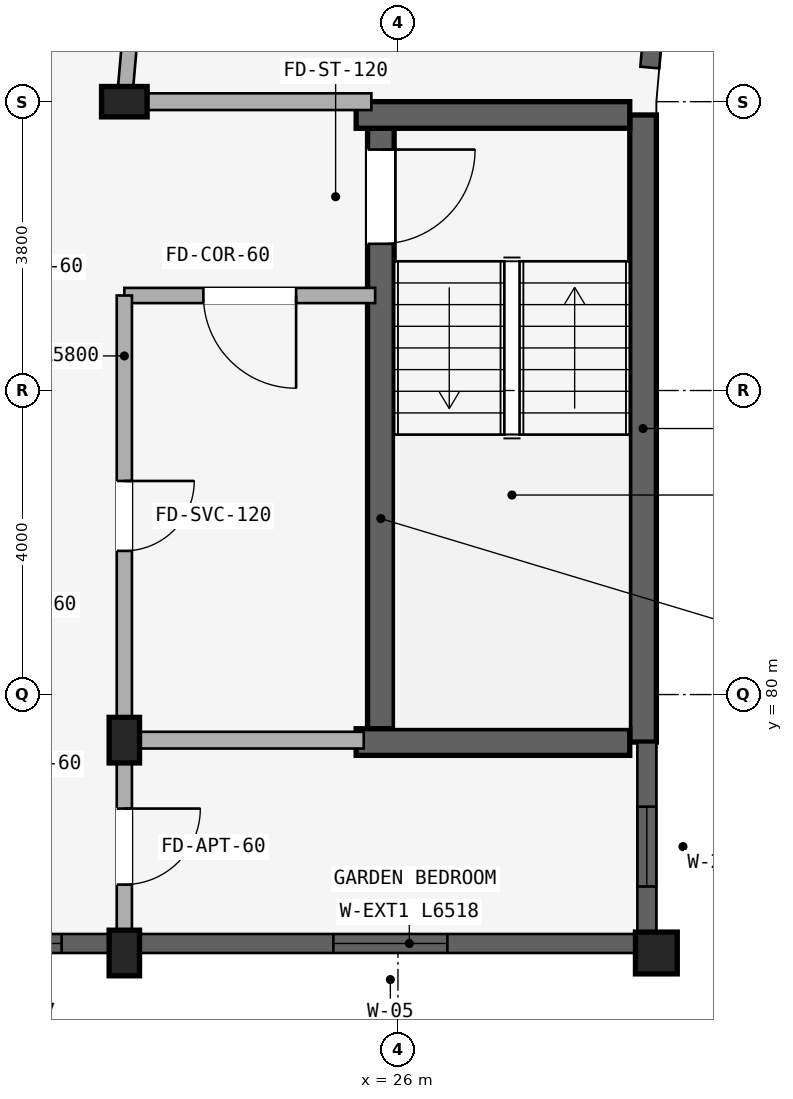
"""IFC4 building model, lengths in metres.
Left out: names, types, materials, properties, quantities, classifications, styles, units other than length and angle.
Written with IfcOpenShell. Run it as: python <this file> out.ifc"""

import sys

from ifc_helpers import new_model, si_unit, direction, frame, frame_2d, origin, origin_2d, place, context, subcontext, project, spatial, rectangle, extrude, element, fill, save


model = new_model("IFC4")
c1 = context("Model", 3, precision=1e-05, world=origin(), true_north=direction((0.0, 1.0)))
c2 = subcontext(c1, "Body", "Model", "MODEL_VIEW")
j1 = project(units=[si_unit("LENGTHUNIT", "METRE"), si_unit("PLANEANGLEUNIT", "RADIAN")], contexts=[c1])
p1 = place(None, origin())
s1 = spatial("IfcSite", under=j1, at=p1, CompositionType="ELEMENT")
p2 = place(p1, origin())
s2 = spatial("IfcBuilding", under=s1, at=p2, CompositionType="ELEMENT")
p3 = place(p2, frame((0.0, 0.0, 46.5)))
s3 = spatial("IfcBuildingStorey", under=s2, at=p3, CompositionType="ELEMENT", Elevation=46.5)
p4 = place(p3, frame((29.225, 87.625, 0.0), z_axis=(0.0, 0.0, 1.0), x_axis=(0.0, -1.0, 0.0)))
e1 = element("IfcWall", 1, at=p4, inside=s3, PredefinedType="SHEAR", context=c2, shape_type="SweptSolid", body=[
    extrude(rectangle(XDim=8.25, YDim=0.35, at=frame_2d((4.125, 0.0))), origin(), (0.0, 0.0, 1.0), 2.93),
])
p5 = place(p3, frame((25.775, 87.45, 0.0), z_axis=(0.0, 0.0, 1.0), x_axis=(0.0, -1.0, 0.0)))
e2 = element("IfcWall", 2, at=p5, inside=s3, PredefinedType="SHEAR", context=c2, shape_type="SweptSolid", body=[
    extrude(rectangle(XDim=7.9, YDim=0.35, at=frame_2d((3.95, 0.0))), origin(), (0.0, 0.0, 1.0), 2.93),
])
p6 = place(p5, frame((0.28, 0.0, 0.0)))
e3 = element("IfcOpeningElement", 3, at=p6, cuts=e2, PredefinedType="OPENING", context=c2, shape_type="SweptSolid", body=[
    extrude(rectangle(XDim=1.24, YDim=2.15, at=frame_2d((0.62, 1.075))), frame((0.0, 0.185, 0.0), z_axis=(0.0, -1.0, 0.0), x_axis=(1.0, 0.0, 0.0)), (0.0, 0.0, 1.0), 0.37),
])
for number, where, z_axis, x_axis in (
    (4, (29.05, 87.625, 0.0), (0.0, 0.0, 1.0), (-1.0, 0.0, 0.0)),
    (5, (29.05, 79.375, 0.0), (0.0, 0.0, 1.0), (-1.0, 0.0, 0.0)),
):
    element("IfcWall", number, at=place(p3, frame(where, z_axis=z_axis, x_axis=x_axis)), inside=s3, PredefinedType="SHEAR", context=c2, shape_type="SweptSolid", body=[
        extrude(rectangle(XDim=3.6, YDim=0.35, at=frame_2d((1.8, 0.0))), origin(), (0.0, 0.0, 1.0), 2.93),
    ])
for number, where, z_axis, x_axis in (
    (6, (22.4, 87.8, 0.0), (0.0, 0.0, 1.0), (0.0, 1.0, 0.0)),
    (7, (22.4, 79.4, 0.0), (0.0, 0.0, 1.0), (1.0, 0.0, 0.0)),
):
    element("IfcColumn", number, at=place(p3, frame(where, z_axis=z_axis, x_axis=x_axis)), inside=s3, PredefinedType="COLUMN", context=c2, shape_type="SweptSolid", body=[
        extrude(rectangle(XDim=0.4, YDim=0.6, at=origin_2d()), origin(), (0.0, 0.0, 1.0), 2.93),
    ])
p7 = place(p3, frame((29.4, 76.6, 0.0), z_axis=(0.0, 0.0, 1.0), x_axis=(1.0, 0.0, 0.0)))
e8 = element("IfcColumn", 8, at=p7, inside=s3, PredefinedType="COLUMN", context=c2, shape_type="SweptSolid", body=[
    extrude(rectangle(XDim=0.55, YDim=0.55, at=origin_2d()), origin(), (0.0, 0.0, 1.0), 2.93),
])
p8 = place(p3, frame((22.4, 76.6, 0.0), z_axis=(0.0, 0.0, 1.0), x_axis=(1.0, 0.0, 0.0)))
e9 = element("IfcColumn", 9, at=p8, inside=s3, PredefinedType="COLUMN", context=c2, shape_type="SweptSolid", body=[
    extrude(rectangle(XDim=0.4, YDim=0.6, at=origin_2d()), origin(), (0.0, 0.0, 1.0), 2.93),
])
p9 = place(p3, frame((25.7, 85.25, 0.0), z_axis=(0.0, 0.0, 1.0), x_axis=(-1.0, 0.0, 0.0)))
e10 = element("IfcWall", 10, at=p9, inside=s3, PredefinedType="STANDARD", context=c2, shape_type="SweptSolid", body=[
    extrude(rectangle(XDim=3.3, YDim=0.2, at=frame_2d((1.65, 0.0))), origin(), (0.0, 0.0, 1.0), 2.372),
])
p10 = place(p9, frame((1.04, 0.0, 0.0)))
e11 = element("IfcOpeningElement", 11, at=p10, cuts=e10, PredefinedType="OPENING", context=c2, shape_type="SweptSolid", body=[
    extrude(rectangle(XDim=1.22, YDim=2.15, at=frame_2d((0.61, 1.075))), frame((0.0, 0.11, 0.0), z_axis=(0.0, -1.0, 0.0), x_axis=(1.0, 0.0, 0.0)), (0.0, 0.0, 1.0), 0.22),
])
p11 = place(p3, frame((22.4, 85.25, 0.0), z_axis=(0.0, 0.0, 1.0), x_axis=(0.0, -1.0, 0.0)))
e12 = element("IfcWall", 12, at=p11, inside=s3, PredefinedType="STANDARD", context=c2, shape_type="SweptSolid", body=[
    extrude(rectangle(XDim=5.8, YDim=0.2, at=frame_2d((2.9, 0.0))), origin(), (0.0, 0.0, 1.0), 2.372),
])
p12 = place(p11, frame((2.44, 0.0, 0.0)))
e13 = element("IfcOpeningElement", 13, at=p12, cuts=e12, PredefinedType="OPENING", context=c2, shape_type="SweptSolid", body=[
    extrude(rectangle(XDim=0.92, YDim=2.1, at=frame_2d((0.46, 1.05))), frame((0.0, 0.11, 0.0), z_axis=(0.0, -1.0, 0.0), x_axis=(1.0, 0.0, 0.0)), (0.0, 0.0, 1.0), 0.22),
])
p13 = place(p3, frame((22.792, 92.28, 0.0), z_axis=(0.0, 0.0, 1.0), x_axis=(-0.087187153726, -0.996191949488, 0.0)))
e14 = element("IfcWall", 14, at=p13, inside=s3, PredefinedType="STANDARD", context=c2, shape_type="SweptSolid", body=[
    extrude(rectangle(XDim=4.497, YDim=0.2, at=frame_2d((2.249, 0.0))), origin(), (0.0, 0.0, 1.0), 2.372),
])
p14 = place(p3, frame((25.65, 87.8, 0.0), z_axis=(0.0, 0.0, 1.0), x_axis=(-1.0, 0.0, 0.0)))
e15 = element("IfcWall", 15, at=p14, inside=s3, PredefinedType="STANDARD", context=c2, shape_type="SweptSolid", body=[
    extrude(rectangle(XDim=3.2, YDim=0.22, at=frame_2d((1.6, 0.0))), origin(), (0.0, 0.0, 1.0), 2.372),
])
p15 = place(p3, frame((22.4, 79.4, 0.0), z_axis=(0.0, 0.0, 1.0), x_axis=(0.0, -1.0, 0.0)))
e16 = element("IfcWall", 16, at=p15, inside=s3, PredefinedType="STANDARD", context=c2, shape_type="SweptSolid", body=[
    extrude(rectangle(XDim=2.8, YDim=0.2, at=frame_2d((1.4, 0.0))), origin(), (0.0, 0.0, 1.0), 2.372),
])
p16 = place(p15, frame((0.9, 0.0, 0.0)))
e17 = element("IfcOpeningElement", 17, at=p16, cuts=e16, PredefinedType="OPENING", context=c2, shape_type="SweptSolid", body=[
    extrude(rectangle(XDim=1.0, YDim=2.15, at=frame_2d((0.5, 1.075))), frame((0.0, 0.11, 0.0), z_axis=(0.0, -1.0, 0.0), x_axis=(1.0, 0.0, 0.0)), (0.0, 0.0, 1.0), 0.22),
])
p17 = place(p3, frame((25.55, 79.4, 0.0), z_axis=(0.0, 0.0, 1.0), x_axis=(-1.0, 0.0, 0.0)))
e18 = element("IfcWall", 18, at=p17, inside=s3, PredefinedType="STANDARD", context=c2, shape_type="SweptSolid", body=[
    extrude(rectangle(XDim=3.1, YDim=0.22, at=frame_2d((1.55, 0.0))), origin(), (0.0, 0.0, 1.0), 2.372),
])
p18 = place(p3, frame((29.541, 90.848, 0.0), z_axis=(0.0, 0.0, 1.0), x_axis=(-0.087227322402, -0.996188433092, 0.0)))
e19 = element("IfcWall", 19, at=p18, inside=s3, PredefinedType="STANDARD", context=c2, shape_type="SweptSolid", body=[
    extrude(rectangle(XDim=2.609, YDim=0.25, at=frame_2d((1.304, 0.0))), origin(), (0.0, 0.0, 1.0), 2.472),
])
p19 = place(p18, frame((0.66, 0.0, 0.622)))
e20 = element("IfcOpeningElement", 20, at=p19, cuts=e19, PredefinedType="OPENING", context=c2, shape_type="SweptSolid", body=[
    extrude(rectangle(XDim=1.5, YDim=1.65, at=frame_2d((0.75, 0.825))), frame((0.0, 0.135, 0.0), z_axis=(0.0, -1.0, 0.0), x_axis=(1.0, 0.0, 0.0)), (0.0, 0.0, 1.0), 0.27),
])
p20 = place(p3, frame((29.275, 79.372, 0.0), z_axis=(0.0, 0.0, 1.0), x_axis=(0.0, -1.0, 0.0)))
e21 = element("IfcWall", 21, at=p20, inside=s3, PredefinedType="STANDARD", context=c2, shape_type="SweptSolid", body=[
    extrude(rectangle(XDim=2.493, YDim=0.25, at=frame_2d((1.247, 0.0))), origin(), (0.0, 0.0, 1.0), 2.472),
])
p21 = place(p20, frame((0.846, 0.0, 0.88)))
e22 = element("IfcOpeningElement", 22, at=p21, cuts=e21, PredefinedType="OPENING", context=c2, shape_type="SweptSolid", body=[
    extrude(rectangle(XDim=1.05, YDim=1.25, at=frame_2d((0.525, 0.625))), frame((0.0, 0.135, 0.0), z_axis=(0.0, -1.0, 0.0), x_axis=(1.0, 0.0, 0.0)), (0.0, 0.0, 1.0), 0.27),
])
p22 = place(p3, frame((29.122, 76.725, 0.0), z_axis=(0.0, 0.0, 1.0), x_axis=(-1.0, 0.0, 0.0)))
e23 = element("IfcWall", 23, at=p22, inside=s3, PredefinedType="STANDARD", context=c2, shape_type="SweptSolid", body=[
    extrude(rectangle(XDim=6.518, YDim=0.25, at=frame_2d((3.259, 0.0))), origin(), (0.0, 0.0, 1.0), 2.372),
])
p23 = place(p22, frame((2.471, 0.0, 0.522)))
e24 = element("IfcOpeningElement", 24, at=p23, cuts=e23, PredefinedType="OPENING", context=c2, shape_type="SweptSolid", body=[
    extrude(rectangle(XDim=1.5, YDim=1.65, at=frame_2d((0.75, 0.825))), frame((0.0, 0.135, 0.0), z_axis=(0.0, -1.0, 0.0), x_axis=(1.0, 0.0, 0.0)), (0.0, 0.0, 1.0), 0.27),
])
p24 = place(p3, frame((22.197, 76.725, 0.0), z_axis=(0.0, 0.0, 1.0), x_axis=(-1.0, 0.0, 0.0)))
e25 = element("IfcWall", 25, at=p24, inside=s3, PredefinedType="STANDARD", context=c2, shape_type="SweptSolid", body=[
    extrude(rectangle(XDim=1.993, YDim=0.25, at=frame_2d((0.997, 0.0))), origin(), (0.0, 0.0, 1.0), 2.372),
])
p25 = place(p24, frame((0.622, 0.0, 0.88)))
e26 = element("IfcOpeningElement", 26, at=p25, cuts=e25, PredefinedType="OPENING", context=c2, shape_type="SweptSolid", body=[
    extrude(rectangle(XDim=0.75, YDim=1.05, at=frame_2d((0.375, 0.525))), frame((0.0, 0.135, 0.0), z_axis=(0.0, -1.0, 0.0), x_axis=(1.0, 0.0, 0.0)), (0.0, 0.0, 1.0), 0.27),
])
p26 = place(p21, origin())
e27 = element("IfcWindow", 27, at=p26, inside=s3, PartitioningType="SINGLE_PANEL", PredefinedType="WINDOW", context=c2, shape_type="SweptSolid", body=[
    extrude(rectangle(XDim=1.05, YDim=1.25, at=frame_2d((0.525, 0.625))), frame((0.0, 0.03, 0.0), z_axis=(0.0, -1.0, 0.0), x_axis=(1.0, 0.0, 0.0)), (0.0, 0.0, 1.0), 0.06),
])
fill(e22, e27)
p27 = place(p23, origin())
e28 = element("IfcWindow", 28, at=p27, inside=s3, PartitioningType="DOUBLE_PANEL_VERTICAL", PredefinedType="WINDOW", context=c2, shape_type="SweptSolid", body=[
    extrude(rectangle(XDim=1.5, YDim=1.65, at=frame_2d((0.75, 0.825))), frame((0.0, 0.03, 0.0), z_axis=(0.0, -1.0, 0.0), x_axis=(1.0, 0.0, 0.0)), (0.0, 0.0, 1.0), 0.06),
])
fill(e24, e28)
p28 = place(p25, origin())
e29 = element("IfcWindow", 29, at=p28, inside=s3, PartitioningType="SINGLE_PANEL", PredefinedType="WINDOW", context=c2, shape_type="SweptSolid", body=[
    extrude(rectangle(XDim=0.75, YDim=1.05, at=frame_2d((0.375, 0.525))), frame((0.0, 0.03, 0.0), z_axis=(0.0, -1.0, 0.0), x_axis=(1.0, 0.0, 0.0)), (0.0, 0.0, 1.0), 0.06),
])
fill(e26, e29)
p29 = place(p6, origin())
e30 = element("IfcDoor", 30, at=p29, inside=s3, OperationType="SINGLE_SWING_LEFT", PredefinedType="DOOR", context=c2, shape_type="SweptSolid", body=[
    extrude(rectangle(XDim=1.24, YDim=2.15, at=frame_2d((0.62, 1.075))), frame((0.0, 0.025, 0.0), z_axis=(0.0, -1.0, 0.0), x_axis=(1.0, 0.0, 0.0)), (0.0, 0.0, 1.0), 0.05),
])
fill(e3, e30)
p30 = place(p10, origin())
e31 = element("IfcDoor", 31, at=p30, inside=s3, OperationType="SINGLE_SWING_LEFT", PredefinedType="DOOR", context=c2, shape_type="SweptSolid", body=[
    extrude(rectangle(XDim=1.22, YDim=2.15, at=frame_2d((0.61, 1.075))), frame((0.0, 0.025, 0.0), z_axis=(0.0, -1.0, 0.0), x_axis=(1.0, 0.0, 0.0)), (0.0, 0.0, 1.0), 0.05),
])
fill(e11, e31)
p31 = place(p12, frame((0.92, 0.0, 0.0), z_axis=(0.0, 0.0, 1.0), x_axis=(-1.0, 0.0, 0.0)))
e32 = element("IfcDoor", 32, at=p31, inside=s3, OperationType="SINGLE_SWING_RIGHT", PredefinedType="DOOR", context=c2, shape_type="SweptSolid", body=[
    extrude(rectangle(XDim=0.92, YDim=2.1, at=frame_2d((0.46, 1.05))), frame((0.0, 0.025, 0.0), z_axis=(0.0, -1.0, 0.0), x_axis=(1.0, 0.0, 0.0)), (0.0, 0.0, 1.0), 0.05),
])
fill(e13, e32)
p32 = place(p16, frame((1.0, 0.0, 0.0), z_axis=(0.0, 0.0, 1.0), x_axis=(-1.0, 0.0, 0.0)))
e33 = element("IfcDoor", 33, at=p32, inside=s3, OperationType="SINGLE_SWING_RIGHT", PredefinedType="DOOR", context=c2, shape_type="SweptSolid", body=[
    extrude(rectangle(XDim=1.0, YDim=2.15, at=frame_2d((0.5, 1.075))), frame((0.0, 0.025, 0.0), z_axis=(0.0, -1.0, 0.0), x_axis=(1.0, 0.0, 0.0)), (0.0, 0.0, 1.0), 0.05),
])
fill(e17, e33)
save(model, sys.argv[1])
